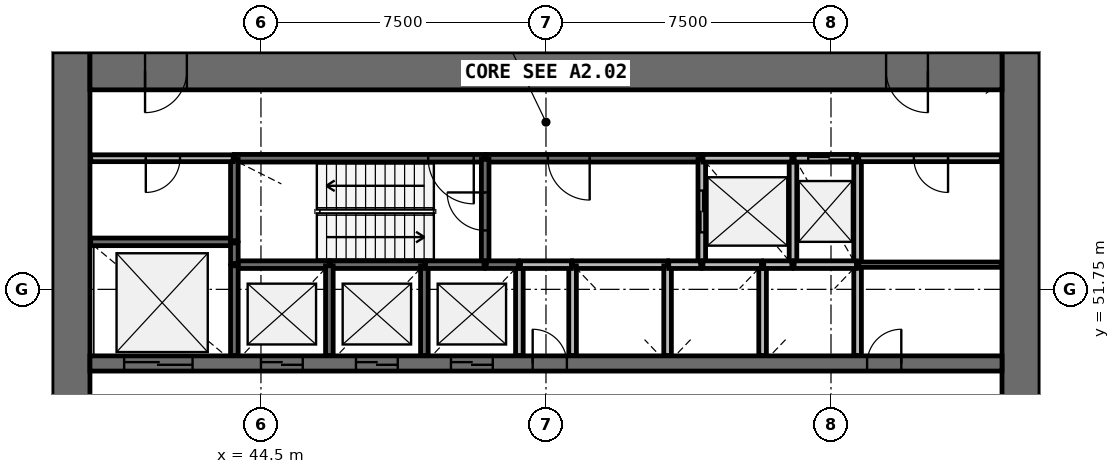
"""IFC4 building model, lengths in metres.
Left out: names, types, materials, properties, quantities, classifications, styles, units other than length and angle.
Written with IfcOpenShell. Run it as: python <this file> out.ifc"""

import sys

from ifc_helpers import new_model, si_unit, direction, frame, frame_2d, origin, place, context, subcontext, project, spatial, rectangle, extrude, source, transform, mapped, element, fill, save


model = new_model("IFC4")
c1 = context("Model", 3, precision=1e-05, world=origin(), true_north=direction((0.0, 1.0)))
c2 = subcontext(c1, "Body", "Model", "MODEL_VIEW")
j1 = project(units=[si_unit("LENGTHUNIT", "METRE"), si_unit("PLANEANGLEUNIT", "RADIAN")], contexts=[c1])
p1 = place(None, origin())
s1 = spatial("IfcSite", under=j1, at=p1, CompositionType="ELEMENT")
p2 = place(p1, origin())
s2 = spatial("IfcBuilding", under=s1, at=p2, CompositionType="ELEMENT")
p3 = place(p2, frame((0.0, 0.0, 5.0)))
s3 = spatial("IfcBuildingStorey", under=s2, at=p3, CompositionType="ELEMENT", Elevation=5.0)
p4 = place(p3, frame((64.5, 38.0, 0.0), z_axis=(0.0, 0.0, 1.0), x_axis=(0.0, 1.0, 0.0)))
e1 = element("IfcWall", 1, at=p4, inside=s3, PredefinedType="SHEAR", context=c2, shape_type="SweptSolid", body=[
    extrude(rectangle(XDim=20.0, YDim=1.0, at=frame_2d((10.0, 0.0))), origin(), (0.0, 0.0, 1.0), 4.4),
])
p5 = place(p4, frame((9.1, 0.0, 0.0)))
e2 = element("IfcOpeningElement", 2, at=p5, cuts=e1, PredefinedType="OPENING", context=c2, shape_type="SweptSolid", body=[
    extrude(rectangle(XDim=1.8, YDim=2.1, at=frame_2d((0.9, 1.05))), frame((0.0, 0.51, 0.0), z_axis=(0.0, -1.0, 0.0), x_axis=(1.0, 0.0, 0.0)), (0.0, 0.0, 1.0), 1.02),
])
p6 = place(p3, frame((39.5, 58.0, 0.0), z_axis=(0.0, 0.0, 1.0), x_axis=(0.0, -1.0, 0.0)))
e3 = element("IfcWall", 3, at=p6, inside=s3, PredefinedType="SHEAR", context=c2, shape_type="SweptSolid", body=[
    extrude(rectangle(XDim=20.0, YDim=1.0, at=frame_2d((10.0, 0.0))), origin(), (0.0, 0.0, 1.0), 4.4),
])
p7 = place(p6, frame((9.1, 0.0, 0.0)))
e4 = element("IfcOpeningElement", 4, at=p7, cuts=e3, PredefinedType="OPENING", context=c2, shape_type="SweptSolid", body=[
    extrude(rectangle(XDim=1.8, YDim=2.1, at=frame_2d((0.9, 1.05))), frame((0.0, 0.51, 0.0), z_axis=(0.0, -1.0, 0.0), x_axis=(1.0, 0.0, 0.0)), (0.0, 0.0, 1.0), 1.02),
])
p8 = place(p3, frame((64.0, 57.5, 0.0), z_axis=(0.0, 0.0, 1.0), x_axis=(-1.0, 0.0, 0.0)))
e5 = element("IfcWall", 5, at=p8, inside=s3, PredefinedType="SHEAR", context=c2, shape_type="SweptSolid", body=[
    extrude(rectangle(XDim=24.0, YDim=1.0, at=frame_2d((12.0, 0.0))), origin(), (0.0, 0.0, 1.0), 4.4),
])
p9 = place(p8, frame((21.45, 0.0, 0.0)))
e6 = element("IfcOpeningElement", 6, at=p9, cuts=e5, PredefinedType="OPENING", context=c2, shape_type="SweptSolid", body=[
    extrude(rectangle(XDim=1.1, YDim=2.1, at=frame_2d((0.55, 1.05))), frame((0.0, 0.51, 0.0), z_axis=(0.0, -1.0, 0.0), x_axis=(1.0, 0.0, 0.0)), (0.0, 0.0, 1.0), 1.02),
])
p10 = place(p8, frame((1.95, 0.0, 0.0)))
e7 = element("IfcOpeningElement", 7, at=p10, cuts=e5, PredefinedType="OPENING", context=c2, shape_type="SweptSolid", body=[
    extrude(rectangle(XDim=1.1, YDim=2.1, at=frame_2d((0.55, 1.05))), frame((0.0, 0.51, 0.0), z_axis=(0.0, -1.0, 0.0), x_axis=(1.0, 0.0, 0.0)), (0.0, 0.0, 1.0), 1.02),
])
p11 = place(p3, frame((40.0, 49.8, 0.0), z_axis=(0.0, 0.0, 1.0), x_axis=(1.0, 0.0, 0.0)))
e8 = element("IfcWall", 8, at=p11, inside=s3, PredefinedType="SHEAR", context=c2, shape_type="SweptSolid", body=[
    extrude(rectangle(XDim=24.0, YDim=0.4, at=frame_2d((12.0, 0.0))), origin(), (0.0, 0.0, 1.0), 4.4),
])
p12 = place(p11, frame((4.5, 0.0, 0.0)))
e9 = element("IfcOpeningElement", 9, at=p12, cuts=e8, PredefinedType="OPENING", context=c2, shape_type="SweptSolid", body=[
    extrude(rectangle(XDim=1.1, YDim=2.1, at=frame_2d((0.55, 1.05))), frame((0.0, 0.21, 0.0), z_axis=(0.0, -1.0, 0.0), x_axis=(1.0, 0.0, 0.0)), (0.0, 0.0, 1.0), 0.42),
])
p13 = place(p11, frame((7.0, 0.0, 0.0)))
e10 = element("IfcOpeningElement", 10, at=p13, cuts=e8, PredefinedType="OPENING", context=c2, shape_type="SweptSolid", body=[
    extrude(rectangle(XDim=1.1, YDim=2.1, at=frame_2d((0.55, 1.05))), frame((0.0, 0.21, 0.0), z_axis=(0.0, -1.0, 0.0), x_axis=(1.0, 0.0, 0.0)), (0.0, 0.0, 1.0), 0.42),
])
p14 = place(p11, frame((9.5, 0.0, 0.0)))
e11 = element("IfcOpeningElement", 11, at=p14, cuts=e8, PredefinedType="OPENING", context=c2, shape_type="SweptSolid", body=[
    extrude(rectangle(XDim=1.1, YDim=2.1, at=frame_2d((0.55, 1.05))), frame((0.0, 0.21, 0.0), z_axis=(0.0, -1.0, 0.0), x_axis=(1.0, 0.0, 0.0)), (0.0, 0.0, 1.0), 0.42),
])
p15 = place(p11, frame((0.9, 0.0, 0.0)))
e12 = element("IfcOpeningElement", 12, at=p15, cuts=e8, PredefinedType="OPENING", context=c2, shape_type="SweptSolid", body=[
    extrude(rectangle(XDim=1.8, YDim=2.4, at=frame_2d((0.9, 1.2))), frame((0.0, 0.21, 0.0), z_axis=(0.0, -1.0, 0.0), x_axis=(1.0, 0.0, 0.0)), (0.0, 0.0, 1.0), 0.42),
])
p16 = place(p11, frame((20.45, 0.0, 0.0)))
e13 = element("IfcOpeningElement", 13, at=p16, cuts=e8, PredefinedType="OPENING", context=c2, shape_type="SweptSolid", body=[
    extrude(rectangle(XDim=0.9, YDim=2.1, at=frame_2d((0.45, 1.05))), frame((0.0, 0.21, 0.0), z_axis=(0.0, -1.0, 0.0), x_axis=(1.0, 0.0, 0.0)), (0.0, 0.0, 1.0), 0.42),
])
p17 = place(p11, frame((11.65, 0.0, 0.0)))
e14 = element("IfcOpeningElement", 14, at=p17, cuts=e8, PredefinedType="OPENING", context=c2, shape_type="SweptSolid", body=[
    extrude(rectangle(XDim=0.9, YDim=2.1, at=frame_2d((0.45, 1.05))), frame((0.0, 0.21, 0.0), z_axis=(0.0, -1.0, 0.0), x_axis=(1.0, 0.0, 0.0)), (0.0, 0.0, 1.0), 0.42),
])
p18 = place(p3, frame((50.4, 55.2, 0.0), z_axis=(0.0, 0.0, 1.0), x_axis=(-1.0, 0.0, 0.0)))
e15 = element("IfcWall", 15, at=p18, inside=s3, PredefinedType="SOLIDWALL", context=c2, shape_type="SweptSolid", body=[
    extrude(rectangle(XDim=6.6, YDim=0.2, at=frame_2d((3.3, 0.0))), origin(), (0.0, 0.0, 1.0), 4.05),
])
p19 = place(p18, frame((0.3, 0.0, 0.0)))
e16 = element("IfcOpeningElement", 16, at=p19, cuts=e15, PredefinedType="OPENING", context=c2, shape_type="SweptSolid", body=[
    extrude(rectangle(XDim=1.2, YDim=2.1, at=frame_2d((0.6, 1.05))), frame((0.0, 0.11, 0.0), z_axis=(0.0, -1.0, 0.0), x_axis=(1.0, 0.0, 0.0)), (0.0, 0.0, 1.0), 0.22),
])
p20 = place(p3, frame((56.1, 55.2, 0.0), z_axis=(0.0, 0.0, 1.0), x_axis=(-1.0, 0.0, 0.0)))
e17 = element("IfcWall", 17, at=p20, inside=s3, PredefinedType="SOLIDWALL", context=c2, shape_type="SweptSolid", body=[
    extrude(rectangle(XDim=5.67, YDim=0.2, at=frame_2d((2.835, 0.0))), origin(), (0.0, 0.0, 1.0), 4.05),
])
p21 = place(p20, frame((2.95, 0.0, 0.0)))
e18 = element("IfcOpeningElement", 18, at=p21, cuts=e17, PredefinedType="OPENING", context=c2, shape_type="SweptSolid", body=[
    extrude(rectangle(XDim=1.1, YDim=2.1, at=frame_2d((0.55, 1.05))), frame((0.0, 0.11, 0.0), z_axis=(0.0, -1.0, 0.0), x_axis=(1.0, 0.0, 0.0)), (0.0, 0.0, 1.0), 0.22),
])
p22 = place(p3, frame((43.8, 53.0, 0.0), z_axis=(0.0, 0.0, 1.0), x_axis=(-1.0, 0.0, 0.0)))
e19 = element("IfcWall", 19, at=p22, inside=s3, PredefinedType="SOLIDWALL", context=c2, shape_type="SweptSolid", body=[
    extrude(rectangle(XDim=3.78, YDim=0.2, at=frame_2d((1.89, 0.0))), origin(), (0.0, 0.0, 1.0), 4.05),
])
p23 = place(p3, frame((50.4, 52.4, 0.0), z_axis=(0.0, 0.0, 1.0), x_axis=(0.0, 1.0, 0.0)))
e20 = element("IfcWall", 20, at=p23, inside=s3, PredefinedType="SOLIDWALL", context=c2, shape_type="SweptSolid", body=[
    extrude(rectangle(XDim=2.77, YDim=0.2, at=frame_2d((1.385, 0.0))), origin(), (0.0, 0.0, 1.0), 4.05),
])
p24 = place(p23, frame((0.9, 0.0, 0.0)))
e21 = element("IfcOpeningElement", 21, at=p24, cuts=e20, PredefinedType="OPENING", context=c2, shape_type="SweptSolid", body=[
    extrude(rectangle(XDim=1.0, YDim=2.1, at=frame_2d((0.5, 1.05))), frame((0.0, 0.11, 0.0), z_axis=(0.0, -1.0, 0.0), x_axis=(1.0, 0.0, 0.0)), (0.0, 0.0, 1.0), 0.22),
])
p25 = place(p3, frame((56.1, 55.17, 0.0), z_axis=(0.0, 0.0, 1.0), x_axis=(0.0, -1.0, 0.0)))
e22 = element("IfcWall", 22, at=p25, inside=s3, PredefinedType="SOLIDWALL", context=c2, shape_type="SweptSolid", body=[
    extrude(rectangle(XDim=2.77, YDim=0.2, at=frame_2d((1.385, 0.0))), origin(), (0.0, 0.0, 1.0), 4.05),
])
p26 = place(p25, frame((0.82, 0.0, 0.0)))
e23 = element("IfcOpeningElement", 23, at=p26, cuts=e22, PredefinedType="OPENING", context=c2, shape_type="SweptSolid", body=[
    extrude(rectangle(XDim=1.1, YDim=2.1, at=frame_2d((0.55, 1.05))), frame((0.0, 0.11, 0.0), z_axis=(0.0, -1.0, 0.0), x_axis=(1.0, 0.0, 0.0)), (0.0, 0.0, 1.0), 0.22),
])
for number, where, z_axis, x_axis in (
    (24, (58.5, 52.4, 0.0), (0.0, 0.0, 1.0), (0.0, 1.0, 0.0)),
    (25, (60.2, 52.4, 0.0), (0.0, 0.0, 1.0), (0.0, 1.0, 0.0)),
):
    element("IfcWall", number, at=place(p3, frame(where, z_axis=z_axis, x_axis=x_axis)), inside=s3, PredefinedType="SOLIDWALL", context=c2, shape_type="SweptSolid", body=[
        extrude(rectangle(XDim=2.8, YDim=0.2, at=frame_2d((1.4, 0.0))), origin(), (0.0, 0.0, 1.0), 4.05),
    ])
p27 = place(p3, frame((46.3, 52.4, 0.0), z_axis=(0.0, 0.0, 1.0), x_axis=(-1.0, 0.0, 0.0)))
e26 = element("IfcWall", 26, at=p27, inside=s3, PredefinedType="SOLIDWALL", context=c2, shape_type="SweptSolid", body=[
    extrude(rectangle(XDim=2.5, YDim=0.2, at=frame_2d((1.25, 0.0))), origin(), (0.0, 0.0, 1.0), 4.05),
])
p28 = place(p3, frame((48.8, 52.4, 0.0), z_axis=(0.0, 0.0, 1.0), x_axis=(-1.0, 0.0, 0.0)))
e27 = element("IfcWall", 27, at=p28, inside=s3, PredefinedType="SOLIDWALL", context=c2, shape_type="SweptSolid", body=[
    extrude(rectangle(XDim=2.47, YDim=0.2, at=frame_2d((1.235, 0.0))), origin(), (0.0, 0.0, 1.0), 4.05),
])
p29 = place(p3, frame((55.2, 52.4, 0.0), z_axis=(0.0, 0.0, 1.0), x_axis=(-1.0, 0.0, 0.0)))
e28 = element("IfcWall", 28, at=p29, inside=s3, PredefinedType="SOLIDWALL", context=c2, shape_type="SweptSolid", body=[
    extrude(rectangle(XDim=2.5, YDim=0.2, at=frame_2d((1.25, 0.0))), origin(), (0.0, 0.0, 1.0), 4.05),
])
p30 = place(p3, frame((58.47, 55.2, 0.0), z_axis=(0.0, 0.0, 1.0), x_axis=(-1.0, 0.0, 0.0)))
e29 = element("IfcWall", 29, at=p30, inside=s3, PredefinedType="SOLIDWALL", context=c2, shape_type="SweptSolid", body=[
    extrude(rectangle(XDim=2.34, YDim=0.2, at=frame_2d((1.17, 0.0))), origin(), (0.0, 0.0, 1.0), 4.05),
])
for number, where, z_axis, x_axis in (
    (30, (43.8, 52.37, 0.0), (0.0, 0.0, 1.0), (0.0, -1.0, 0.0)),
    (31, (46.3, 50.01, 0.0), (0.0, 0.0, 1.0), (0.0, 1.0, 0.0)),
    (32, (48.8, 50.01, 0.0), (0.0, 0.0, 1.0), (0.0, 1.0, 0.0)),
):
    element("IfcWall", number, at=place(p3, frame(where, z_axis=z_axis, x_axis=x_axis)), inside=s3, PredefinedType="SOLIDWALL", context=c2, shape_type="SweptSolid", body=[
        extrude(rectangle(XDim=2.36, YDim=0.2, at=frame_2d((1.18, 0.0))), origin(), (0.0, 0.0, 1.0), 4.05),
    ])
p31 = place(p3, frame((51.3, 50.01, 0.0), z_axis=(0.0, 0.0, 1.0), x_axis=(0.0, 1.0, 0.0)))
e33 = element("IfcWall", 33, at=p31, inside=s3, PredefinedType="SOLIDWALL", context=c2, shape_type="SweptSolid", body=[
    extrude(rectangle(XDim=2.39, YDim=0.2, at=frame_2d((1.195, 0.0))), origin(), (0.0, 0.0, 1.0), 4.05),
])
for number, where, z_axis, x_axis in (
    (34, (52.7, 52.37, 0.0), (0.0, 0.0, 1.0), (0.0, -1.0, 0.0)),
    (35, (55.2, 50.01, 0.0), (0.0, 0.0, 1.0), (0.0, 1.0, 0.0)),
):
    element("IfcWall", number, at=place(p3, frame(where, z_axis=z_axis, x_axis=x_axis)), inside=s3, PredefinedType="SOLIDWALL", context=c2, shape_type="SweptSolid", body=[
        extrude(rectangle(XDim=2.36, YDim=0.2, at=frame_2d((1.18, 0.0))), origin(), (0.0, 0.0, 1.0), 4.05),
    ])
p32 = place(p3, frame((57.7, 50.01, 0.0), z_axis=(0.0, 0.0, 1.0), x_axis=(0.0, 1.0, 0.0)))
e36 = element("IfcWall", 36, at=p32, inside=s3, PredefinedType="SOLIDWALL", context=c2, shape_type="SweptSolid", body=[
    extrude(rectangle(XDim=2.39, YDim=0.2, at=frame_2d((1.195, 0.0))), origin(), (0.0, 0.0, 1.0), 4.05),
])
p33 = place(p3, frame((60.2, 50.01, 0.0), z_axis=(0.0, 0.0, 1.0), x_axis=(0.0, 1.0, 0.0)))
e37 = element("IfcWall", 37, at=p33, inside=s3, PredefinedType="SOLIDWALL", context=c2, shape_type="SweptSolid", body=[
    extrude(rectangle(XDim=2.36, YDim=0.2, at=frame_2d((1.18, 0.0))), origin(), (0.0, 0.0, 1.0), 4.05),
])
p34 = place(p3, frame((43.8, 55.17, 0.0), z_axis=(0.0, 0.0, 1.0), x_axis=(0.0, -1.0, 0.0)))
e38 = element("IfcWall", 38, at=p34, inside=s3, PredefinedType="SOLIDWALL", context=c2, shape_type="SweptSolid", body=[
    extrude(rectangle(XDim=2.14, YDim=0.2, at=frame_2d((1.07, 0.0))), origin(), (0.0, 0.0, 1.0), 4.05),
])
p35 = place(p3, frame((60.17, 52.4, 0.0), z_axis=(0.0, 0.0, 1.0), x_axis=(-1.0, 0.0, 0.0)))
e39 = element("IfcWall", 39, at=p35, inside=s3, PredefinedType="SOLIDWALL", context=c2, shape_type="SweptSolid", body=[
    extrude(rectangle(XDim=1.64, YDim=0.2, at=frame_2d((0.82, 0.0))), origin(), (0.0, 0.0, 1.0), 4.05),
])
p36 = place(p3, frame((60.17, 55.2, 0.0), z_axis=(0.0, 0.0, 1.0), x_axis=(-1.0, 0.0, 0.0)))
e40 = element("IfcWall", 40, at=p36, inside=s3, PredefinedType="SOLIDWALL", context=c2, shape_type="SweptSolid", body=[
    extrude(rectangle(XDim=1.64, YDim=0.2, at=frame_2d((0.82, 0.0))), origin(), (0.0, 0.0, 1.0), 4.05),
])
p37 = place(p36, frame((0.17, 0.0, 0.0)))
e41 = element("IfcOpeningElement", 41, at=p37, cuts=e40, PredefinedType="OPENING", context=c2, shape_type="SweptSolid", body=[
    extrude(rectangle(XDim=1.1, YDim=2.1, at=frame_2d((0.55, 1.05))), frame((0.0, 0.11, 0.0), z_axis=(0.0, -1.0, 0.0), x_axis=(1.0, 0.0, 0.0)), (0.0, 0.0, 1.0), 0.22),
])
for number, where, z_axis, x_axis in (
    (42, (50.37, 52.4, 0.0), (0.0, 0.0, 1.0), (-1.0, 0.0, 0.0)),
    (43, (57.67, 52.4, 0.0), (0.0, 0.0, 1.0), (-1.0, 0.0, 0.0)),
):
    element("IfcWall", number, at=place(p3, frame(where, z_axis=z_axis, x_axis=x_axis)), inside=s3, PredefinedType="SOLIDWALL", context=c2, shape_type="SweptSolid", body=[
        extrude(rectangle(XDim=1.54, YDim=0.2, at=frame_2d((0.77, 0.0))), origin(), (0.0, 0.0, 1.0), 4.05),
    ])
p38 = place(p3, frame((51.33, 52.4, 0.0), z_axis=(0.0, 0.0, 1.0), x_axis=(1.0, 0.0, 0.0)))
e44 = element("IfcWall", 44, at=p38, inside=s3, PredefinedType="SOLIDWALL", context=c2, shape_type="SweptSolid", body=[
    extrude(rectangle(XDim=1.34, YDim=0.2, at=frame_2d((0.67, 0.0))), origin(), (0.0, 0.0, 1.0), 4.05),
])
for number, where, z_axis, x_axis in (
    (45, (51.27, 52.4, 0.0), (0.0, 0.0, 1.0), (-1.0, 0.0, 0.0)),
    (46, (56.07, 52.4, 0.0), (0.0, 0.0, 1.0), (-1.0, 0.0, 0.0)),
):
    element("IfcWall", number, at=place(p3, frame(where, z_axis=z_axis, x_axis=x_axis)), inside=s3, PredefinedType="SOLIDWALL", context=c2, shape_type="SweptSolid", body=[
        extrude(rectangle(XDim=0.84, YDim=0.2, at=frame_2d((0.42, 0.0))), origin(), (0.0, 0.0, 1.0), 4.05),
    ])
p39 = place(p3, frame((58.47, 52.4, 0.0), z_axis=(0.0, 0.0, 1.0), x_axis=(-1.0, 0.0, 0.0)))
e47 = element("IfcWall", 47, at=p39, inside=s3, PredefinedType="SOLIDWALL", context=c2, shape_type="SweptSolid", body=[
    extrude(rectangle(XDim=0.74, YDim=0.2, at=frame_2d((0.37, 0.0))), origin(), (0.0, 0.0, 1.0), 4.05),
])
p40 = place(p3, frame((43.8, 52.43, 0.0), z_axis=(0.0, 0.0, 1.0), x_axis=(0.0, 1.0, 0.0)))
e48 = element("IfcWall", 48, at=p40, inside=s3, PredefinedType="SOLIDWALL", context=c2, shape_type="SweptSolid", body=[
    extrude(rectangle(XDim=0.54, YDim=0.2, at=frame_2d((0.27, 0.0))), origin(), (0.0, 0.0, 1.0), 4.05),
])
p41 = place(p3, frame((43.77, 55.2, 0.0), z_axis=(0.0, 0.0, 1.0), x_axis=(-1.0, 0.0, 0.0)))
e49 = element("IfcWall", 49, at=p41, inside=s3, PredefinedType="PARTITIONING", context=c2, shape_type="SweptSolid", body=[
    extrude(rectangle(XDim=3.75, YDim=0.18, at=frame_2d((1.875, 0.0))), origin(), (0.0, 0.0, 1.0), 4.05),
])
p42 = place(p41, frame((1.4, 0.0, 0.0)))
e50 = element("IfcOpeningElement", 50, at=p42, cuts=e49, PredefinedType="OPENING", context=c2, shape_type="SweptSolid", body=[
    extrude(rectangle(XDim=0.9, YDim=2.1, at=frame_2d((0.45, 1.05))), frame((0.0, 0.1, 0.0), z_axis=(0.0, -1.0, 0.0), x_axis=(1.0, 0.0, 0.0)), (0.0, 0.0, 1.0), 0.2),
])
p43 = place(p3, frame((63.98, 55.2, 0.0), z_axis=(0.0, 0.0, 1.0), x_axis=(-1.0, 0.0, 0.0)))
e51 = element("IfcWall", 51, at=p43, inside=s3, PredefinedType="PARTITIONING", context=c2, shape_type="SweptSolid", body=[
    extrude(rectangle(XDim=3.75, YDim=0.18, at=frame_2d((1.875, 0.0))), origin(), (0.0, 0.0, 1.0), 4.05),
])
p44 = place(p43, frame((1.4, 0.0, 0.0)))
e52 = element("IfcOpeningElement", 52, at=p44, cuts=e51, PredefinedType="OPENING", context=c2, shape_type="SweptSolid", body=[
    extrude(rectangle(XDim=0.9, YDim=2.1, at=frame_2d((0.45, 1.05))), frame((0.0, 0.1, 0.0), z_axis=(0.0, -1.0, 0.0), x_axis=(1.0, 0.0, 0.0)), (0.0, 0.0, 1.0), 0.2),
])
p45 = place(p3, frame((63.98, 52.4, 0.0), z_axis=(0.0, 0.0, 1.0), x_axis=(-1.0, 0.0, 0.0)))
e53 = element("IfcWall", 53, at=p45, inside=s3, PredefinedType="PARTITIONING", context=c2, shape_type="SweptSolid", body=[
    extrude(rectangle(XDim=3.75, YDim=0.14, at=frame_2d((1.875, 0.0))), origin(), (0.0, 0.0, 1.0), 3.25),
])
m1 = source(origin(), c2, "Body", "SweptSolid", [
    extrude(rectangle(XDim=1.1, YDim=2.1, at=frame_2d((0.55, 1.05))), frame((0.0, 0.025, 0.0), z_axis=(0.0, -1.0, 0.0), x_axis=(1.0, 0.0, 0.0)), (0.0, 0.0, 1.0), 0.05),
])
p46 = place(p12, origin())
e54 = element("IfcDoor", 54, at=p46, inside=s3, OperationType="DOUBLE_DOOR_SLIDING", PredefinedType="USERDEFINED", context=c2, shape_type="MappedRepresentation", body=[
    mapped(m1, transform((0.0, 0.0, 0.0), scale=1.0)),
])
fill(e9, e54)
p47 = place(p13, origin())
e55 = element("IfcDoor", 55, at=p47, inside=s3, OperationType="DOUBLE_DOOR_SLIDING", PredefinedType="USERDEFINED", context=c2, shape_type="MappedRepresentation", body=[
    mapped(m1, transform((0.0, 0.0, 0.0), scale=1.0)),
])
fill(e10, e55)
p48 = place(p14, origin())
e56 = element("IfcDoor", 56, at=p48, inside=s3, OperationType="DOUBLE_DOOR_SLIDING", PredefinedType="USERDEFINED", context=c2, shape_type="MappedRepresentation", body=[
    mapped(m1, transform((0.0, 0.0, 0.0), scale=1.0)),
])
fill(e11, e56)
p49 = place(p26, origin())
e57 = element("IfcDoor", 57, at=p49, inside=s3, OperationType="DOUBLE_DOOR_SLIDING", PredefinedType="USERDEFINED", context=c2, shape_type="MappedRepresentation", body=[
    mapped(m1, transform((0.0, 0.0, 0.0), scale=1.0)),
])
fill(e23, e57)
p50 = place(p37, origin())
e58 = element("IfcDoor", 58, at=p50, inside=s3, OperationType="DOUBLE_DOOR_SLIDING", PredefinedType="USERDEFINED", context=c2, shape_type="MappedRepresentation", body=[
    mapped(m1, transform((0.0, 0.0, 0.0), scale=1.0)),
])
fill(e41, e58)
m2 = source(origin(), c2, "Body", "SweptSolid", [
    extrude(rectangle(XDim=1.8, YDim=2.4, at=frame_2d((0.9, 1.2))), frame((0.0, 0.025, 0.0), z_axis=(0.0, -1.0, 0.0), x_axis=(1.0, 0.0, 0.0)), (0.0, 0.0, 1.0), 0.05),
])
p51 = place(p15, origin())
e59 = element("IfcDoor", 59, at=p51, inside=s3, OperationType="DOUBLE_DOOR_SLIDING", PredefinedType="USERDEFINED", context=c2, shape_type="MappedRepresentation", body=[
    mapped(m2, transform((0.0, 0.0, 0.0), scale=1.0)),
])
fill(e12, e59)
m3 = source(origin(), c2, "Body", "SweptSolid", [
    extrude(rectangle(XDim=1.2, YDim=2.1, at=frame_2d((0.6, 1.05))), frame((0.0, 0.025, 0.0), z_axis=(0.0, -1.0, 0.0), x_axis=(1.0, 0.0, 0.0)), (0.0, 0.0, 1.0), 0.05),
])
p52 = place(p19, origin())
e60 = element("IfcDoor", 60, at=p52, inside=s3, OperationType="SINGLE_SWING_LEFT", PredefinedType="DOOR", context=c2, shape_type="MappedRepresentation", body=[
    mapped(m3, transform((0.0, 0.0, 0.0), scale=1.0)),
])
fill(e16, e60)
m4 = source(origin(), c2, "Body", "SweptSolid", [
    extrude(rectangle(XDim=1.0, YDim=2.1, at=frame_2d((0.5, 1.05))), frame((0.0, 0.025, 0.0), z_axis=(0.0, -1.0, 0.0), x_axis=(1.0, 0.0, 0.0)), (0.0, 0.0, 1.0), 0.05),
])
p53 = place(p24, origin())
e61 = element("IfcDoor", 61, at=p53, inside=s3, OperationType="SINGLE_SWING_RIGHT", PredefinedType="DOOR", context=c2, shape_type="MappedRepresentation", body=[
    mapped(m4, transform((0.0, 0.0, 0.0), scale=1.0)),
])
fill(e21, e61)
m5 = source(origin(), c2, "Body", "SweptSolid", [
    extrude(rectangle(XDim=1.1, YDim=2.1, at=frame_2d((0.55, 1.05))), frame((0.0, 0.025, 0.0), z_axis=(0.0, -1.0, 0.0), x_axis=(1.0, 0.0, 0.0)), (0.0, 0.0, 1.0), 0.05),
])
p54 = place(p21, origin())
e62 = element("IfcDoor", 62, at=p54, inside=s3, OperationType="SINGLE_SWING_LEFT", PredefinedType="DOOR", context=c2, shape_type="MappedRepresentation", body=[
    mapped(m5, transform((0.0, 0.0, 0.0), scale=1.0)),
])
fill(e18, e62)
m6 = source(origin(), c2, "Body", "SweptSolid", [
    extrude(rectangle(XDim=1.1, YDim=2.1, at=frame_2d((0.55, 1.05))), frame((0.0, 0.025, 0.0), z_axis=(0.0, -1.0, 0.0), x_axis=(1.0, 0.0, 0.0)), (0.0, 0.0, 1.0), 0.05),
])
p55 = place(p9, origin())
e63 = element("IfcDoor", 63, at=p55, inside=s3, OperationType="SINGLE_SWING_RIGHT", PredefinedType="DOOR", context=c2, shape_type="MappedRepresentation", body=[
    mapped(m6, transform((0.0, 0.0, 0.0), scale=1.0)),
])
fill(e6, e63)
p56 = place(p10, origin())
e64 = element("IfcDoor", 64, at=p56, inside=s3, OperationType="SINGLE_SWING_LEFT", PredefinedType="DOOR", context=c2, shape_type="MappedRepresentation", body=[
    mapped(m6, transform((0.0, 0.0, 0.0), scale=1.0)),
])
fill(e7, e64)
m7 = source(origin(), c2, "Body", "SweptSolid", [
    extrude(rectangle(XDim=0.9, YDim=2.1, at=frame_2d((0.45, 1.05))), frame((0.0, 0.025, 0.0), z_axis=(0.0, -1.0, 0.0), x_axis=(1.0, 0.0, 0.0)), (0.0, 0.0, 1.0), 0.05),
])
p57 = place(p42, origin())
e65 = element("IfcDoor", 65, at=p57, inside=s3, OperationType="SINGLE_SWING_RIGHT", PredefinedType="DOOR", context=c2, shape_type="MappedRepresentation", body=[
    mapped(m7, transform((0.0, 0.0, 0.0), scale=1.0)),
])
fill(e50, e65)
p58 = place(p16, origin())
e66 = element("IfcDoor", 66, at=p58, inside=s3, OperationType="SINGLE_SWING_RIGHT", PredefinedType="DOOR", context=c2, shape_type="MappedRepresentation", body=[
    mapped(m7, transform((0.0, 0.0, 0.0), scale=1.0)),
])
fill(e13, e66)
p59 = place(p44, origin())
e67 = element("IfcDoor", 67, at=p59, inside=s3, OperationType="SINGLE_SWING_LEFT", PredefinedType="DOOR", context=c2, shape_type="MappedRepresentation", body=[
    mapped(m7, transform((0.0, 0.0, 0.0), scale=1.0)),
])
fill(e52, e67)
p60 = place(p17, origin())
e68 = element("IfcDoor", 68, at=p60, inside=s3, OperationType="SINGLE_SWING_LEFT", PredefinedType="DOOR", context=c2, shape_type="MappedRepresentation", body=[
    mapped(m7, transform((0.0, 0.0, 0.0), scale=1.0)),
])
fill(e14, e68)
save(model, sys.argv[1])
